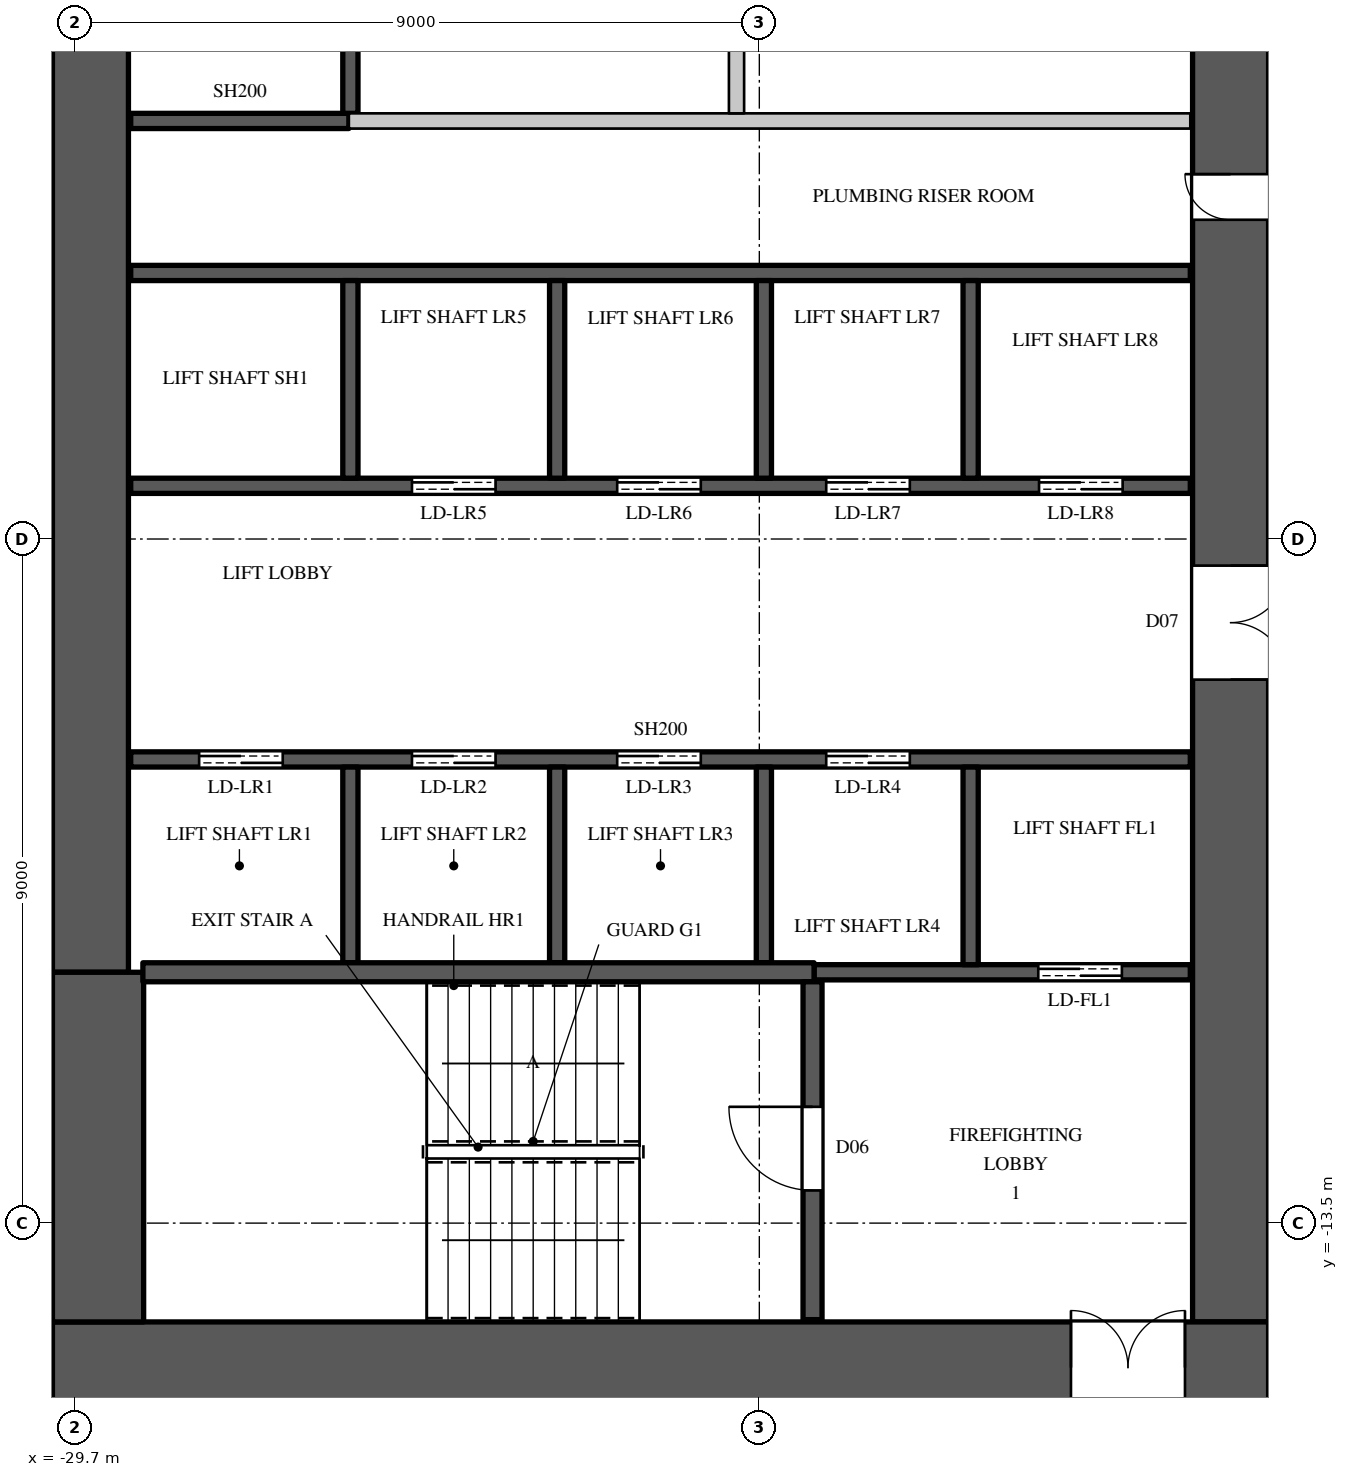
"""IFC4 building model, lengths in metres.
Left out: names, types, materials, properties, quantities, classifications, styles, units other than length and angle.
Written with IfcOpenShell. Run it as: python <this file> out.ifc"""

import sys

from ifc_helpers import new_model, si_unit, direction, frame, frame_2d, origin, place, context, subcontext, project, spatial, rectangle, extrude, element, fill, save


model = new_model("IFC4")
c1 = context("Model", 3, precision=1e-05, world=origin(), true_north=direction((0.0, 1.0)))
c2 = subcontext(c1, "Body", "Model", "MODEL_VIEW")
j1 = project(units=[si_unit("LENGTHUNIT", "METRE"), si_unit("PLANEANGLEUNIT", "RADIAN")], contexts=[c1])
p1 = place(None, origin())
s1 = spatial("IfcSite", under=j1, at=p1, CompositionType="ELEMENT")
p2 = place(p1, origin())
s2 = spatial("IfcBuilding", under=s1, at=p2, CompositionType="ELEMENT")
p3 = place(p2, frame((0.0, 0.0, 55.5)))
s3 = spatial("IfcBuildingStorey", under=s2, at=p3, CompositionType="ELEMENT", Elevation=55.5)
p4 = place(p3, frame((-30.0, -15.4, 0.0), z_axis=(0.0, 0.0, 1.0), x_axis=(1.0, 0.0, 0.0)))
e1 = element("IfcWall", 1, at=p4, inside=s3, PredefinedType="SHEAR", context=c2, shape_type="SweptSolid", body=[
    extrude(rectangle(XDim=16.0, YDim=1.2, at=frame_2d((8.0, 0.0))), origin(), (0.0, 0.0, 1.0), 3.6),
])
p5 = place(p4, frame((13.4, 0.0, 0.0)))
e2 = element("IfcOpeningElement", 2, at=p5, cuts=e1, PredefinedType="OPENING", context=c2, shape_type="SweptSolid", body=[
    extrude(rectangle(XDim=1.5, YDim=2.4, at=frame_2d((0.75, 1.2))), frame((0.0, 0.61, 0.0), z_axis=(0.0, -1.0, 0.0), x_axis=(1.0, 0.0, 0.0)), (0.0, 0.0, 1.0), 1.22),
])
p6 = place(p3, frame((-14.5, -14.8, 0.0), z_axis=(0.0, 0.0, 1.0), x_axis=(0.0, 1.0, 0.0)))
e3 = element("IfcWall", 3, at=p6, inside=s3, PredefinedType="SHEAR", context=c2, shape_type="SweptSolid", body=[
    extrude(rectangle(XDim=29.6, YDim=1.0, at=frame_2d((14.8, 0.0))), origin(), (0.0, 0.0, 1.0), 3.6),
])
p7 = place(p6, frame((8.45, 0.0, 0.0)))
e4 = element("IfcOpeningElement", 4, at=p7, cuts=e3, PredefinedType="OPENING", context=c2, shape_type="SweptSolid", body=[
    extrude(rectangle(XDim=1.5, YDim=2.4, at=frame_2d((0.75, 1.2))), frame((0.0, 0.51, 0.0), z_axis=(0.0, -1.0, 0.0), x_axis=(1.0, 0.0, 0.0)), (0.0, 0.0, 1.0), 1.02),
])
p8 = place(p6, frame((19.65, 0.0, 0.0)))
e5 = element("IfcOpeningElement", 5, at=p8, cuts=e3, PredefinedType="OPENING", context=c2, shape_type="SweptSolid", body=[
    extrude(rectangle(XDim=1.5, YDim=2.4, at=frame_2d((0.75, 1.2))), frame((0.0, 0.51, 0.0), z_axis=(0.0, -1.0, 0.0), x_axis=(1.0, 0.0, 0.0)), (0.0, 0.0, 1.0), 1.02),
])
p9 = place(p6, frame((14.5, 0.0, 0.0)))
e6 = element("IfcOpeningElement", 6, at=p9, cuts=e3, PredefinedType="OPENING", context=c2, shape_type="SweptSolid", body=[
    extrude(rectangle(XDim=0.6, YDim=2.0, at=frame_2d((0.3, 1.0))), frame((0.0, 0.51, 0.0), z_axis=(0.0, -1.0, 0.0), x_axis=(1.0, 0.0, 0.0)), (0.0, 0.0, 1.0), 1.02),
])
p10 = place(p3, frame((-29.5, -10.2, 0.0), z_axis=(0.0, 0.0, 1.0), x_axis=(0.0, 1.0, 0.0)))
e7 = element("IfcWall", 7, at=p10, inside=s3, PredefinedType="SHEAR", context=c2, shape_type="SweptSolid", body=[
    extrude(rectangle(XDim=20.4, YDim=1.0, at=frame_2d((10.2, 0.0))), origin(), (0.0, 0.0, 1.0), 3.6),
])
p11 = place(p3, frame((-29.4, -14.8, 0.0), z_axis=(0.0, 0.0, 1.0), x_axis=(0.0, 1.0, 0.0)))
e8 = element("IfcWall", 8, at=p11, inside=s3, PredefinedType="SHEAR", context=c2, shape_type="SweptSolid", body=[
    extrude(rectangle(XDim=4.6, YDim=1.2, at=frame_2d((2.3, 0.0))), origin(), (0.0, 0.0, 1.0), 3.6),
])
p12 = place(p3, frame((-26.1, 1.0, 0.0), z_axis=(0.0, 0.0, 1.0), x_axis=(1.0, 0.0, 0.0)))
e9 = element("IfcWall", 9, at=p12, inside=s3, PredefinedType="PARTITIONING", context=c2, shape_type="SweptSolid", body=[
    extrude(rectangle(XDim=11.07, YDim=0.2, at=frame_2d((5.535, 0.0))), origin(), (0.0, 0.0, 1.0), 3.3),
])
p13 = place(p3, frame((-21.0, 1.1, 0.0), z_axis=(0.0, 0.0, 1.0), x_axis=(0.0, 1.0, 0.0)))
e10 = element("IfcWall", 10, at=p13, inside=s3, PredefinedType="PARTITIONING", context=c2, shape_type="SweptSolid", body=[
    extrude(rectangle(XDim=2.6, YDim=0.2, at=frame_2d((1.3, 0.0))), origin(), (0.0, 0.0, 1.0), 3.3),
])
p14 = place(p3, frame((-28.97, -7.4, 0.0), z_axis=(0.0, 0.0, 1.0), x_axis=(1.0, 0.0, 0.0)))
e11 = element("IfcWall", 11, at=p14, inside=s3, PredefinedType="SHEAR", context=c2, shape_type="SweptSolid", body=[
    extrude(rectangle(XDim=13.94, YDim=0.2, at=frame_2d((6.97, 0.0))), origin(), (0.0, 0.0, 1.0), 3.3),
])
p15 = place(p14, frame((0.9, 0.0, 0.0)))
e12 = element("IfcOpeningElement", 12, at=p15, cuts=e11, PredefinedType="OPENING", context=c2, shape_type="SweptSolid", body=[
    extrude(rectangle(XDim=1.1, YDim=2.2, at=frame_2d((0.55, 1.1))), frame((0.0, 0.11, 0.0), z_axis=(0.0, -1.0, 0.0), x_axis=(1.0, 0.0, 0.0)), (0.0, 0.0, 1.0), 0.22),
])
p16 = place(p14, frame((3.7, 0.0, 0.0)))
e13 = element("IfcOpeningElement", 13, at=p16, cuts=e11, PredefinedType="OPENING", context=c2, shape_type="SweptSolid", body=[
    extrude(rectangle(XDim=1.1, YDim=2.2, at=frame_2d((0.55, 1.1))), frame((0.0, 0.11, 0.0), z_axis=(0.0, -1.0, 0.0), x_axis=(1.0, 0.0, 0.0)), (0.0, 0.0, 1.0), 0.22),
])
p17 = place(p14, frame((6.4, 0.0, 0.0)))
e14 = element("IfcOpeningElement", 14, at=p17, cuts=e11, PredefinedType="OPENING", context=c2, shape_type="SweptSolid", body=[
    extrude(rectangle(XDim=1.1, YDim=2.2, at=frame_2d((0.55, 1.1))), frame((0.0, 0.11, 0.0), z_axis=(0.0, -1.0, 0.0), x_axis=(1.0, 0.0, 0.0)), (0.0, 0.0, 1.0), 0.22),
])
p18 = place(p14, frame((9.15, 0.0, 0.0)))
e15 = element("IfcOpeningElement", 15, at=p18, cuts=e11, PredefinedType="OPENING", context=c2, shape_type="SweptSolid", body=[
    extrude(rectangle(XDim=1.1, YDim=2.2, at=frame_2d((0.55, 1.1))), frame((0.0, 0.11, 0.0), z_axis=(0.0, -1.0, 0.0), x_axis=(1.0, 0.0, 0.0)), (0.0, 0.0, 1.0), 0.22),
])
p19 = place(p3, frame((-28.97, -3.8, 0.0), z_axis=(0.0, 0.0, 1.0), x_axis=(1.0, 0.0, 0.0)))
e16 = element("IfcWall", 16, at=p19, inside=s3, PredefinedType="SHEAR", context=c2, shape_type="SweptSolid", body=[
    extrude(rectangle(XDim=13.94, YDim=0.2, at=frame_2d((6.97, 0.0))), origin(), (0.0, 0.0, 1.0), 3.3),
])
p20 = place(p19, frame((3.7, 0.0, 0.0)))
e17 = element("IfcOpeningElement", 17, at=p20, cuts=e16, PredefinedType="OPENING", context=c2, shape_type="SweptSolid", body=[
    extrude(rectangle(XDim=1.1, YDim=2.2, at=frame_2d((0.55, 1.1))), frame((0.0, 0.11, 0.0), z_axis=(0.0, -1.0, 0.0), x_axis=(1.0, 0.0, 0.0)), (0.0, 0.0, 1.0), 0.22),
])
p21 = place(p19, frame((6.4, 0.0, 0.0)))
e18 = element("IfcOpeningElement", 18, at=p21, cuts=e16, PredefinedType="OPENING", context=c2, shape_type="SweptSolid", body=[
    extrude(rectangle(XDim=1.1, YDim=2.2, at=frame_2d((0.55, 1.1))), frame((0.0, 0.11, 0.0), z_axis=(0.0, -1.0, 0.0), x_axis=(1.0, 0.0, 0.0)), (0.0, 0.0, 1.0), 0.22),
])
p22 = place(p19, frame((9.15, 0.0, 0.0)))
e19 = element("IfcOpeningElement", 19, at=p22, cuts=e16, PredefinedType="OPENING", context=c2, shape_type="SweptSolid", body=[
    extrude(rectangle(XDim=1.1, YDim=2.2, at=frame_2d((0.55, 1.1))), frame((0.0, 0.11, 0.0), z_axis=(0.0, -1.0, 0.0), x_axis=(1.0, 0.0, 0.0)), (0.0, 0.0, 1.0), 0.22),
])
p23 = place(p19, frame((11.95, 0.0, 0.0)))
e20 = element("IfcOpeningElement", 20, at=p23, cuts=e16, PredefinedType="OPENING", context=c2, shape_type="SweptSolid", body=[
    extrude(rectangle(XDim=1.1, YDim=2.2, at=frame_2d((0.55, 1.1))), frame((0.0, 0.11, 0.0), z_axis=(0.0, -1.0, 0.0), x_axis=(1.0, 0.0, 0.0)), (0.0, 0.0, 1.0), 0.22),
])
p24 = place(p3, frame((-28.97, -1.0, 0.0), z_axis=(0.0, 0.0, 1.0), x_axis=(1.0, 0.0, 0.0)))
e21 = element("IfcWall", 21, at=p24, inside=s3, PredefinedType="SHEAR", context=c2, shape_type="SweptSolid", body=[
    extrude(rectangle(XDim=13.94, YDim=0.2, at=frame_2d((6.97, 0.0))), origin(), (0.0, 0.0, 1.0), 3.3),
])
p25 = place(p3, frame((-28.97, 1.0, 0.0), z_axis=(0.0, 0.0, 1.0), x_axis=(1.0, 0.0, 0.0)))
e22 = element("IfcWall", 22, at=p25, inside=s3, PredefinedType="SHEAR", context=c2, shape_type="SweptSolid", body=[
    extrude(rectangle(XDim=2.87, YDim=0.2, at=frame_2d((1.435, 0.0))), origin(), (0.0, 0.0, 1.0), 3.3),
])
p26 = place(p3, frame((-26.08, -10.075, 0.0), z_axis=(0.0, 0.0, 1.0), x_axis=(0.0, 1.0, 0.0)))
e23 = element("IfcWall", 23, at=p26, inside=s3, PredefinedType="SHEAR", context=c2, shape_type="SweptSolid", body=[
    extrude(rectangle(XDim=2.575, YDim=0.2, at=frame_2d((1.288, 0.0))), origin(), (0.0, 0.0, 1.0), 3.6),
])
p27 = place(p3, frame((-26.08, -3.7, 0.0), z_axis=(0.0, 0.0, 1.0), x_axis=(0.0, 1.0, 0.0)))
e24 = element("IfcWall", 24, at=p27, inside=s3, PredefinedType="SHEAR", context=c2, shape_type="SweptSolid", body=[
    extrude(rectangle(XDim=2.6, YDim=0.2, at=frame_2d((1.3, 0.0))), origin(), (0.0, 0.0, 1.0), 3.6),
])
p28 = place(p3, frame((-26.08, 1.1, 0.0), z_axis=(0.0, 0.0, 1.0), x_axis=(0.0, 1.0, 0.0)))
e25 = element("IfcWall", 25, at=p28, inside=s3, PredefinedType="SHEAR", context=c2, shape_type="SweptSolid", body=[
    extrude(rectangle(XDim=2.6, YDim=0.2, at=frame_2d((1.3, 0.0))), origin(), (0.0, 0.0, 1.0), 3.3),
])
p29 = place(p3, frame((-23.36, -10.075, 0.0), z_axis=(0.0, 0.0, 1.0), x_axis=(0.0, 1.0, 0.0)))
e26 = element("IfcWall", 26, at=p29, inside=s3, PredefinedType="SHEAR", context=c2, shape_type="SweptSolid", body=[
    extrude(rectangle(XDim=2.575, YDim=0.2, at=frame_2d((1.288, 0.0))), origin(), (0.0, 0.0, 1.0), 3.6),
])
p30 = place(p3, frame((-23.36, -3.7, 0.0), z_axis=(0.0, 0.0, 1.0), x_axis=(0.0, 1.0, 0.0)))
e27 = element("IfcWall", 27, at=p30, inside=s3, PredefinedType="SHEAR", context=c2, shape_type="SweptSolid", body=[
    extrude(rectangle(XDim=2.6, YDim=0.2, at=frame_2d((1.3, 0.0))), origin(), (0.0, 0.0, 1.0), 3.6),
])
p31 = place(p3, frame((-20.64, -10.075, 0.0), z_axis=(0.0, 0.0, 1.0), x_axis=(0.0, 1.0, 0.0)))
e28 = element("IfcWall", 28, at=p31, inside=s3, PredefinedType="SHEAR", context=c2, shape_type="SweptSolid", body=[
    extrude(rectangle(XDim=2.575, YDim=0.2, at=frame_2d((1.288, 0.0))), origin(), (0.0, 0.0, 1.0), 3.6),
])
p32 = place(p3, frame((-20.64, -3.7, 0.0), z_axis=(0.0, 0.0, 1.0), x_axis=(0.0, 1.0, 0.0)))
e29 = element("IfcWall", 29, at=p32, inside=s3, PredefinedType="SHEAR", context=c2, shape_type="SweptSolid", body=[
    extrude(rectangle(XDim=2.6, YDim=0.2, at=frame_2d((1.3, 0.0))), origin(), (0.0, 0.0, 1.0), 3.6),
])
p33 = place(p3, frame((-19.98, -10.2, 0.0), z_axis=(0.0, 0.0, 1.0), x_axis=(1.0, 0.0, 0.0)))
e30 = element("IfcWall", 30, at=p33, inside=s3, PredefinedType="SHEAR", context=c2, shape_type="SweptSolid", body=[
    extrude(rectangle(XDim=4.95, YDim=0.2, at=frame_2d((2.475, 0.0))), origin(), (0.0, 0.0, 1.0), 3.3),
])
p34 = place(p33, frame((2.95, 0.0, 0.0)))
e31 = element("IfcOpeningElement", 31, at=p34, cuts=e30, PredefinedType="OPENING", context=c2, shape_type="SweptSolid", body=[
    extrude(rectangle(XDim=1.1, YDim=2.2, at=frame_2d((0.55, 1.1))), frame((0.0, 0.11, 0.0), z_axis=(0.0, -1.0, 0.0), x_axis=(1.0, 0.0, 0.0)), (0.0, 0.0, 1.0), 0.22),
])
p35 = place(p3, frame((-17.92, -10.1, 0.0), z_axis=(0.0, 0.0, 1.0), x_axis=(0.0, 1.0, 0.0)))
e32 = element("IfcWall", 32, at=p35, inside=s3, PredefinedType="SHEAR", context=c2, shape_type="SweptSolid", body=[
    extrude(rectangle(XDim=2.6, YDim=0.2, at=frame_2d((1.3, 0.0))), origin(), (0.0, 0.0, 1.0), 3.6),
])
p36 = place(p3, frame((-17.92, -3.7, 0.0), z_axis=(0.0, 0.0, 1.0), x_axis=(0.0, 1.0, 0.0)))
e33 = element("IfcWall", 33, at=p36, inside=s3, PredefinedType="SHEAR", context=c2, shape_type="SweptSolid", body=[
    extrude(rectangle(XDim=2.6, YDim=0.2, at=frame_2d((1.3, 0.0))), origin(), (0.0, 0.0, 1.0), 3.6),
])
p37 = place(p3, frame((-28.81, -10.2, 0.0), z_axis=(0.0, 0.0, 1.0), x_axis=(1.0, 0.0, 0.0)))
e34 = element("IfcWall", 34, at=p37, inside=s3, PredefinedType="SHEAR", context=c2, shape_type="SweptSolid", body=[
    extrude(rectangle(XDim=8.83, YDim=0.25, at=frame_2d((4.415, 0.0))), origin(), (0.0, 0.0, 1.0), 3.3),
])
p38 = place(p3, frame((-20.0, -14.77, 0.0), z_axis=(0.0, 0.0, 1.0), x_axis=(0.0, 1.0, 0.0)))
e35 = element("IfcWall", 35, at=p38, inside=s3, PredefinedType="SHEAR", context=c2, shape_type="SweptSolid", body=[
    extrude(rectangle(XDim=4.445, YDim=0.25, at=frame_2d((2.223, 0.0))), origin(), (0.0, 0.0, 1.0), 3.3),
])
p39 = place(p38, frame((1.7, 0.0, 0.0)))
e36 = element("IfcOpeningElement", 36, at=p39, cuts=e35, PredefinedType="OPENING", context=c2, shape_type="SweptSolid", body=[
    extrude(rectangle(XDim=1.1, YDim=2.2, at=frame_2d((0.55, 1.1))), frame((0.0, 0.135, 0.0), z_axis=(0.0, -1.0, 0.0), x_axis=(1.0, 0.0, 0.0)), (0.0, 0.0, 1.0), 0.27),
])
p40 = place(p39, origin())
e37 = element("IfcDoor", 37, at=p40, inside=s3, OperationType="SINGLE_SWING_RIGHT", PredefinedType="DOOR", context=c2, shape_type="SweptSolid", body=[
    extrude(rectangle(XDim=1.1, YDim=2.2, at=frame_2d((0.55, 1.1))), frame((0.0, 0.025, 0.0), z_axis=(0.0, -1.0, 0.0), x_axis=(1.0, 0.0, 0.0)), (0.0, 0.0, 1.0), 0.05),
])
fill(e36, e37)
p41 = place(p15, origin())
e38 = element("IfcDoor", 38, at=p41, inside=s3, OperationType="DOUBLE_DOOR_SLIDING", PredefinedType="DOOR", context=c2, shape_type="SweptSolid", body=[
    extrude(rectangle(XDim=1.1, YDim=2.2, at=frame_2d((0.55, 1.1))), frame((0.0, 0.025, 0.0), z_axis=(0.0, -1.0, 0.0), x_axis=(1.0, 0.0, 0.0)), (0.0, 0.0, 1.0), 0.05),
])
fill(e12, e38)
p42 = place(p16, origin())
e39 = element("IfcDoor", 39, at=p42, inside=s3, OperationType="DOUBLE_DOOR_SLIDING", PredefinedType="DOOR", context=c2, shape_type="SweptSolid", body=[
    extrude(rectangle(XDim=1.1, YDim=2.2, at=frame_2d((0.55, 1.1))), frame((0.0, 0.025, 0.0), z_axis=(0.0, -1.0, 0.0), x_axis=(1.0, 0.0, 0.0)), (0.0, 0.0, 1.0), 0.05),
])
fill(e13, e39)
p43 = place(p17, origin())
e40 = element("IfcDoor", 40, at=p43, inside=s3, OperationType="DOUBLE_DOOR_SLIDING", PredefinedType="DOOR", context=c2, shape_type="SweptSolid", body=[
    extrude(rectangle(XDim=1.1, YDim=2.2, at=frame_2d((0.55, 1.1))), frame((0.0, 0.025, 0.0), z_axis=(0.0, -1.0, 0.0), x_axis=(1.0, 0.0, 0.0)), (0.0, 0.0, 1.0), 0.05),
])
fill(e14, e40)
p44 = place(p18, origin())
e41 = element("IfcDoor", 41, at=p44, inside=s3, OperationType="DOUBLE_DOOR_SLIDING", PredefinedType="DOOR", context=c2, shape_type="SweptSolid", body=[
    extrude(rectangle(XDim=1.1, YDim=2.2, at=frame_2d((0.55, 1.1))), frame((0.0, 0.025, 0.0), z_axis=(0.0, -1.0, 0.0), x_axis=(1.0, 0.0, 0.0)), (0.0, 0.0, 1.0), 0.05),
])
fill(e15, e41)
p45 = place(p34, origin())
e42 = element("IfcDoor", 42, at=p45, inside=s3, OperationType="DOUBLE_DOOR_SLIDING", PredefinedType="DOOR", context=c2, shape_type="SweptSolid", body=[
    extrude(rectangle(XDim=1.1, YDim=2.2, at=frame_2d((0.55, 1.1))), frame((0.0, 0.025, 0.0), z_axis=(0.0, -1.0, 0.0), x_axis=(1.0, 0.0, 0.0)), (0.0, 0.0, 1.0), 0.05),
])
fill(e31, e42)
p46 = place(p20, origin())
e43 = element("IfcDoor", 43, at=p46, inside=s3, OperationType="DOUBLE_DOOR_SLIDING", PredefinedType="DOOR", context=c2, shape_type="SweptSolid", body=[
    extrude(rectangle(XDim=1.1, YDim=2.2, at=frame_2d((0.55, 1.1))), frame((0.0, 0.025, 0.0), z_axis=(0.0, -1.0, 0.0), x_axis=(1.0, 0.0, 0.0)), (0.0, 0.0, 1.0), 0.05),
])
fill(e17, e43)
p47 = place(p21, origin())
e44 = element("IfcDoor", 44, at=p47, inside=s3, OperationType="DOUBLE_DOOR_SLIDING", PredefinedType="DOOR", context=c2, shape_type="SweptSolid", body=[
    extrude(rectangle(XDim=1.1, YDim=2.2, at=frame_2d((0.55, 1.1))), frame((0.0, 0.025, 0.0), z_axis=(0.0, -1.0, 0.0), x_axis=(1.0, 0.0, 0.0)), (0.0, 0.0, 1.0), 0.05),
])
fill(e18, e44)
p48 = place(p22, origin())
e45 = element("IfcDoor", 45, at=p48, inside=s3, OperationType="DOUBLE_DOOR_SLIDING", PredefinedType="DOOR", context=c2, shape_type="SweptSolid", body=[
    extrude(rectangle(XDim=1.1, YDim=2.2, at=frame_2d((0.55, 1.1))), frame((0.0, 0.025, 0.0), z_axis=(0.0, -1.0, 0.0), x_axis=(1.0, 0.0, 0.0)), (0.0, 0.0, 1.0), 0.05),
])
fill(e19, e45)
p49 = place(p23, origin())
e46 = element("IfcDoor", 46, at=p49, inside=s3, OperationType="DOUBLE_DOOR_SLIDING", PredefinedType="DOOR", context=c2, shape_type="SweptSolid", body=[
    extrude(rectangle(XDim=1.1, YDim=2.2, at=frame_2d((0.55, 1.1))), frame((0.0, 0.025, 0.0), z_axis=(0.0, -1.0, 0.0), x_axis=(1.0, 0.0, 0.0)), (0.0, 0.0, 1.0), 0.05),
])
fill(e20, e46)
p50 = place(p5, origin())
e47 = element("IfcDoor", 47, at=p50, inside=s3, OperationType="DOUBLE_DOOR_SINGLE_SWING", PredefinedType="DOOR", context=c2, shape_type="SweptSolid", body=[
    extrude(rectangle(XDim=1.5, YDim=2.4, at=frame_2d((0.75, 1.2))), frame((0.0, 0.025, 0.0), z_axis=(0.0, -1.0, 0.0), x_axis=(1.0, 0.0, 0.0)), (0.0, 0.0, 1.0), 0.05),
])
fill(e2, e47)
p51 = place(p7, origin())
e48 = element("IfcDoor", 48, at=p51, inside=s3, OperationType="DOUBLE_DOOR_SINGLE_SWING", PredefinedType="DOOR", context=c2, shape_type="SweptSolid", body=[
    extrude(rectangle(XDim=1.5, YDim=2.4, at=frame_2d((0.75, 1.2))), frame((0.0, -0.445, 0.0), z_axis=(0.0, -1.0, 0.0), x_axis=(1.0, 0.0, 0.0)), (0.0, 0.0, 1.0), 0.05),
])
fill(e4, e48)
p52 = place(p9, origin())
e49 = element("IfcDoor", 49, at=p52, inside=s3, OperationType="SINGLE_SWING_RIGHT", PredefinedType="DOOR", context=c2, shape_type="SweptSolid", body=[
    extrude(rectangle(XDim=0.6, YDim=2.0, at=frame_2d((0.3, 1.0))), frame((0.0, 0.495, 0.0), z_axis=(0.0, -1.0, 0.0), x_axis=(1.0, 0.0, 0.0)), (0.0, 0.0, 1.0), 0.05),
])
fill(e6, e49)
save(model, sys.argv[1])
